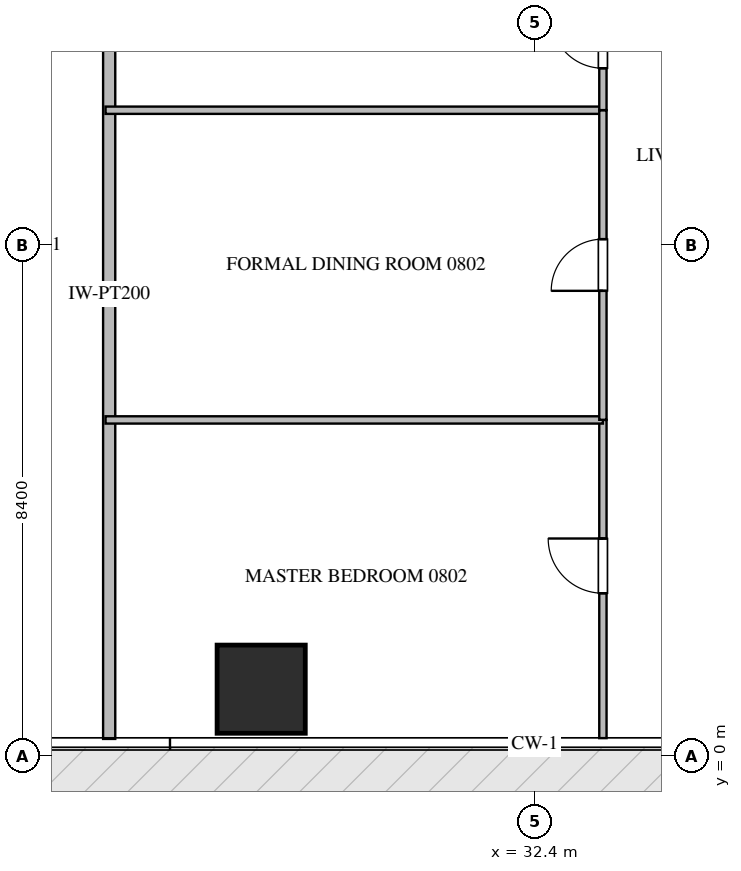
"""IFC4 building model, lengths in metres.
Left out: names, types, materials, properties, quantities, classifications, styles, units other than length and angle.
Written with IfcOpenShell. Run it as: python <this file> out.ifc"""

import sys

from ifc_helpers import new_model, si_unit, direction, frame, frame_2d, origin, origin_2d, place, context, subcontext, project, spatial, rectangle, extrude, source, transform, mapped, element, fill, save


model = new_model("IFC4")
c1 = context("Model", 3, precision=1e-05, world=origin(), true_north=direction((0.0, 1.0)))
c2 = subcontext(c1, "Body", "Model", "MODEL_VIEW")
j1 = project(units=[si_unit("LENGTHUNIT", "METRE"), si_unit("PLANEANGLEUNIT", "RADIAN")], contexts=[c1])
p1 = place(None, origin())
s1 = spatial("IfcSite", under=j1, at=p1, CompositionType="ELEMENT")
p2 = place(p1, origin())
s2 = spatial("IfcBuilding", under=s1, at=p2, CompositionType="ELEMENT")
p3 = place(p2, frame((0.0, 0.0, 37.95)))
s3 = spatial("IfcBuildingStorey", under=s2, at=p3, CompositionType="ELEMENT", Elevation=37.95)
m1 = source(origin(), c2, "Body", "SweptSolid", [
    extrude(rectangle(XDim=1.45, YDim=1.45, at=origin_2d()), origin(), (0.0, 0.0, 1.0), 3.75),
])
p4 = place(p3, frame((27.9, 1.1, -0.26), z_axis=(0.0, 0.0, 1.0), x_axis=(1.0, 0.0, 0.0)))
e1 = element("IfcColumn", 1, at=p4, inside=s3, PredefinedType="COLUMN", context=c2, shape_type="MappedRepresentation", body=[
    mapped(m1, transform((0.0, 0.0, 0.0), scale=1.0)),
])
p5 = place(p3, frame((25.4, 0.282, 0.0), z_axis=(0.0, 0.0, 1.0), x_axis=(0.0, 1.0, 0.0)))
e2 = element("IfcWall", 2, at=p5, inside=s3, PredefinedType="PARTITIONING", context=c2, shape_type="SweptSolid", body=[
    extrude(rectangle(XDim=14.618, YDim=0.2, at=frame_2d((7.309, 0.0))), origin(), (0.0, 0.0, 1.0), 3.49),
])
p6 = place(p3, frame((33.52, 0.295, 0.0), z_axis=(0.0, 0.0, 1.0), x_axis=(0.0, 1.0, 0.0)))
e3 = element("IfcWall", 3, at=p6, inside=s3, PredefinedType="PARTITIONING", context=c2, shape_type="SweptSolid", body=[
    extrude(rectangle(XDim=5.233, YDim=0.12, at=frame_2d((2.617, 0.0))), origin(), (0.0, 0.0, 1.0), 3.49),
])
p7 = place(p6, frame((2.383, 0.0, 0.0)))
e4 = element("IfcOpeningElement", 4, at=p7, cuts=e3, PredefinedType="OPENING", context=c2, shape_type="SweptSolid", body=[
    extrude(rectangle(XDim=0.9, YDim=2.1, at=frame_2d((0.45, 1.05))), frame((0.0, 0.07, 0.0), z_axis=(0.0, -1.0, 0.0), x_axis=(1.0, 0.0, 0.0)), (0.0, 0.0, 1.0), 0.14),
])
for number, where, z_axis, x_axis in (
    (5, (25.34, 5.528, 0.0), (0.0, 0.0, 1.0), (1.0, 0.0, 0.0)),
    (6, (25.34, 10.621, 0.0), (0.0, 0.0, 1.0), (1.0, 0.0, 0.0)),
):
    element("IfcWall", number, at=place(p3, frame(where, z_axis=z_axis, x_axis=x_axis)), inside=s3, PredefinedType="PARTITIONING", context=c2, shape_type="SweptSolid", body=[
        extrude(rectangle(XDim=8.18, YDim=0.12, at=frame_2d((4.09, 0.0))), origin(), (0.0, 0.0, 1.0), 3.49),
    ])
p8 = place(p3, frame((33.52, 5.53, 0.0), z_axis=(0.0, 0.0, 1.0), x_axis=(0.0, 1.0, 0.0)))
e7 = element("IfcWall", 7, at=p8, inside=s3, PredefinedType="PARTITIONING", context=c2, shape_type="SweptSolid", body=[
    extrude(rectangle(XDim=5.091, YDim=0.12, at=frame_2d((2.545, 0.0))), origin(), (0.0, 0.0, 1.0), 3.49),
])
p9 = place(p8, frame((2.121, 0.0, 0.0)))
e8 = element("IfcOpeningElement", 8, at=p9, cuts=e7, PredefinedType="OPENING", context=c2, shape_type="SweptSolid", body=[
    extrude(rectangle(XDim=0.85, YDim=2.1, at=frame_2d((0.425, 1.05))), frame((0.0, 0.07, 0.0), z_axis=(0.0, -1.0, 0.0), x_axis=(1.0, 0.0, 0.0)), (0.0, 0.0, 1.0), 0.14),
])
p10 = place(p3, frame((33.52, 10.623, 0.0), z_axis=(0.0, 0.0, 1.0), x_axis=(0.0, 1.0, 0.0)))
e9 = element("IfcWall", 9, at=p10, inside=s3, PredefinedType="PARTITIONING", context=c2, shape_type="SweptSolid", body=[
    extrude(rectangle(XDim=2.227, YDim=0.12, at=frame_2d((1.114, 0.0))), origin(), (0.0, 0.0, 1.0), 3.49),
])
p11 = place(p10, frame((0.689, 0.0, 0.0)))
e10 = element("IfcOpeningElement", 10, at=p11, cuts=e9, PredefinedType="OPENING", context=c2, shape_type="SweptSolid", body=[
    extrude(rectangle(XDim=0.85, YDim=2.1, at=frame_2d((0.425, 1.05))), frame((0.0, 0.07, 0.0), z_axis=(0.0, -1.0, 0.0), x_axis=(1.0, 0.0, 0.0)), (0.0, 0.0, 1.0), 0.14),
])
m2 = source(origin(), c2, "Body", "SweptSolid", [
    extrude(rectangle(XDim=0.9, YDim=2.1, at=frame_2d((0.45, 1.05))), frame((0.0, 0.025, 0.0), z_axis=(0.0, -1.0, 0.0), x_axis=(1.0, 0.0, 0.0)), (0.0, 0.0, 1.0), 0.05),
])
p12 = place(p7, origin())
e11 = element("IfcDoor", 11, at=p12, inside=s3, OperationType="SINGLE_SWING_RIGHT", PredefinedType="DOOR", context=c2, shape_type="MappedRepresentation", body=[
    mapped(m2, transform((0.0, 0.0, 0.0), scale=1.0)),
])
fill(e4, e11)
m3 = source(origin(), c2, "Body", "SweptSolid", [
    extrude(rectangle(XDim=0.85, YDim=2.1, at=frame_2d((0.425, 1.05))), frame((0.0, 0.025, 0.0), z_axis=(0.0, -1.0, 0.0), x_axis=(1.0, 0.0, 0.0)), (0.0, 0.0, 1.0), 0.05),
])
p13 = place(p9, origin())
e12 = element("IfcDoor", 12, at=p13, inside=s3, OperationType="SINGLE_SWING_LEFT", PredefinedType="DOOR", context=c2, shape_type="MappedRepresentation", body=[
    mapped(m3, transform((0.0, 0.0, 0.0), scale=1.0)),
])
fill(e8, e12)
p14 = place(p11, origin())
e13 = element("IfcDoor", 13, at=p14, inside=s3, OperationType="SINGLE_SWING_RIGHT", PredefinedType="DOOR", context=c2, shape_type="MappedRepresentation", body=[
    mapped(m3, transform((0.0, 0.0, 0.0), scale=1.0)),
])
fill(e10, e13)
save(model, sys.argv[1])
